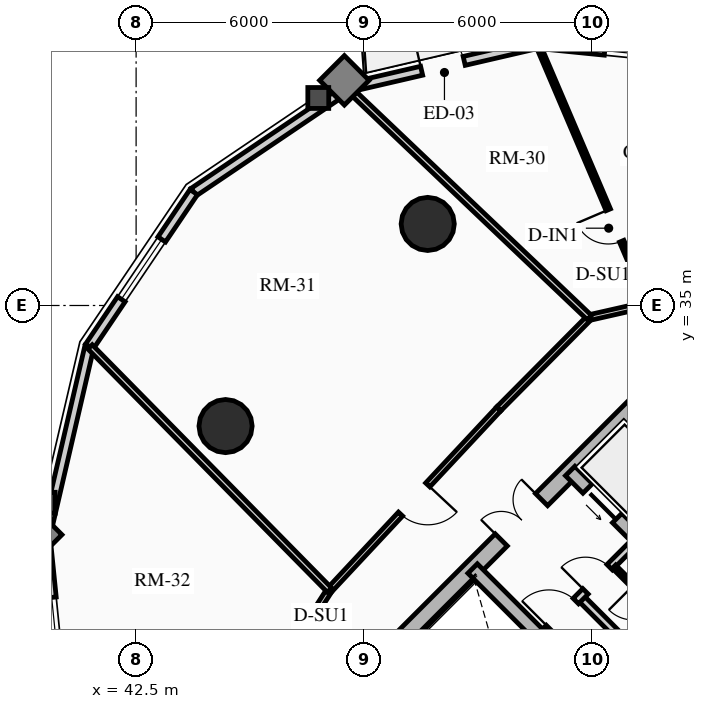
"""IFC4 building model, lengths in metres.
Left out: names, types, materials, properties, quantities, classifications, styles, units other than length and angle.
Written with IfcOpenShell. Run it as: python <this file> out.ifc"""

import sys

from ifc_helpers import new_model, si_unit, direction, frame, frame_2d, origin, origin_2d, place, context, subcontext, project, spatial, rectangle, circle, extrude, source, transform, mapped, element, fill, save


model = new_model("IFC4")
c1 = context("Model", 3, precision=1e-05, world=origin(), true_north=direction((0.0, 1.0)))
c2 = subcontext(c1, "Body", "Model", "MODEL_VIEW")
j1 = project(units=[si_unit("LENGTHUNIT", "METRE"), si_unit("PLANEANGLEUNIT", "RADIAN")], contexts=[c1])
p1 = place(None, origin())
s1 = spatial("IfcSite", under=j1, at=p1, CompositionType="ELEMENT")
p2 = place(p1, origin())
s2 = spatial("IfcBuilding", under=s1, at=p2, CompositionType="ELEMENT")
p3 = place(p2, frame((0.0, 0.0, 84.7)))
s3 = spatial("IfcBuildingStorey", under=s2, at=p3, CompositionType="ELEMENT", Elevation=84.7)
p4 = place(p3, frame((48.856, 25.578, 0.0), z_axis=(0.0, 0.0, 1.0), x_axis=(0.707106781187, 0.707106781187, 0.0)))
e1 = element("IfcWall", 1, at=p4, inside=s3, PredefinedType="SHEAR", context=c2, shape_type="SweptSolid", body=[
    extrude(rectangle(XDim=10.7, YDim=0.45, at=frame_2d((5.35, 0.0))), origin(), (0.0, 0.0, 1.0), 2.91),
])
m1 = source(origin(), c2, "Body", "SweptSolid", [
    extrude(rectangle(XDim=1.5, YDim=2.02, at=frame_2d((0.75, 1.01))), frame((0.0, 0.235, 0.0), z_axis=(0.0, -1.0, 0.0), x_axis=(1.0, 0.0, 0.0)), (0.0, 0.0, 1.0), 0.47),
])
p5 = place(p4, frame((4.6, 0.0, 0.0)))
e2 = element("IfcOpeningElement", 2, at=p5, cuts=e1, PredefinedType="OPENING", context=c2, shape_type="MappedRepresentation", body=[
    mapped(m1, transform((0.0, 0.0, 0.0), x_axis=(1.0, 0.0, 0.0), y_axis=(0.0, 1.0, 0.0), z_axis=(0.0, 0.0, 1.0), scale=1.0)),
])
p6 = place(p3, frame((61.078, 18.355, 0.0), z_axis=(0.0, 0.0, 1.0), x_axis=(-0.707106781187, 0.707106781187, 0.0)))
e3 = element("IfcWall", 3, at=p6, inside=s3, PredefinedType="SHEAR", context=c2, shape_type="SweptSolid", body=[
    extrude(rectangle(XDim=13.75, YDim=0.35, at=frame_2d((6.875, 0.0))), origin(), (0.0, 0.0, 1.0), 2.91),
])
m2 = source(origin(), c2, "Body", "SweptSolid", [
    extrude(rectangle(XDim=1.1, YDim=2.015, at=frame_2d((0.55, 1.007))), frame((0.0, 0.185, 0.0), z_axis=(0.0, -1.0, 0.0), x_axis=(1.0, 0.0, 0.0)), (0.0, 0.0, 1.0), 0.37),
])
p7 = place(p6, frame((4.875, 0.0, 0.0)))
e4 = element("IfcOpeningElement", 4, at=p7, cuts=e3, PredefinedType="OPENING", context=c2, shape_type="MappedRepresentation", body=[
    mapped(m2, transform((0.0, 0.0, 0.0), x_axis=(1.0, 0.0, 0.0), y_axis=(0.0, 1.0, 0.0), z_axis=(0.0, 0.0, 1.0), scale=1.0)),
])
m3 = source(origin(), c2, "Body", "SweptSolid", [
    extrude(rectangle(XDim=1.15, YDim=2.02, at=frame_2d((0.575, 1.01))), frame((0.0, 0.185, 0.0), z_axis=(0.0, -1.0, 0.0), x_axis=(1.0, 0.0, 0.0)), (0.0, 0.0, 1.0), 0.37),
])
p8 = place(p6, frame((7.295, 0.0, 0.0)))
e5 = element("IfcOpeningElement", 5, at=p8, cuts=e3, PredefinedType="OPENING", context=c2, shape_type="MappedRepresentation", body=[
    mapped(m3, transform((0.0, 0.0, 0.0), x_axis=(1.0, 0.0, 0.0), y_axis=(0.0, 1.0, 0.0), z_axis=(0.0, 0.0, 1.0), scale=1.0)),
])
p9 = place(p3, frame((63.645, 20.922, 0.0), z_axis=(0.0, 0.0, 1.0), x_axis=(-0.707106781187, 0.707106781187, 0.0)))
e6 = element("IfcWall", 6, at=p9, inside=s3, PredefinedType="SHEAR", context=c2, shape_type="SweptSolid", body=[
    extrude(rectangle(XDim=13.75, YDim=0.35, at=frame_2d((6.875, 0.0))), origin(), (0.0, 0.0, 1.0), 2.91),
])
p10 = place(p9, frame((10.0, 0.0, 0.0)))
e7 = element("IfcOpeningElement", 7, at=p10, cuts=e6, PredefinedType="OPENING", context=c2, shape_type="MappedRepresentation", body=[
    mapped(m2, transform((0.0, 0.0, 0.0), x_axis=(1.0, 0.0, 0.0), y_axis=(0.0, 1.0, 0.0), z_axis=(0.0, 0.0, 1.0), scale=1.0)),
])
p11 = place(p9, frame((12.0, 0.0, 0.0)))
e8 = element("IfcOpeningElement", 8, at=p11, cuts=e6, PredefinedType="OPENING", context=c2, shape_type="MappedRepresentation", body=[
    mapped(m2, transform((0.0, 0.0, 0.0), x_axis=(1.0, 0.0, 0.0), y_axis=(0.0, 1.0, 0.0), z_axis=(0.0, 0.0, 1.0), scale=1.0)),
])
p12 = place(p9, frame((5.305, 0.0, 0.0)))
e9 = element("IfcOpeningElement", 9, at=p12, cuts=e6, PredefinedType="OPENING", context=c2, shape_type="MappedRepresentation", body=[
    mapped(m3, transform((0.0, 0.0, 0.0), x_axis=(1.0, 0.0, 0.0), y_axis=(0.0, 1.0, 0.0), z_axis=(0.0, 0.0, 1.0), scale=1.0)),
])
for number, where, z_axis, x_axis in (
    (10, (50.173, 37.146, 0.0), (0.0, 0.0, 1.0), (1.0, 0.0, 0.0)),
    (11, (44.854, 31.827, 0.0), (0.0, 0.0, 1.0), (1.0, 0.0, 0.0)),
):
    element("IfcColumn", number, at=place(p3, frame(where, z_axis=z_axis, x_axis=x_axis)), inside=s3, PredefinedType="USERDEFINED", context=c2, shape_type="SweptSolid", body=[
        extrude(circle(Radius=0.7, at=origin_2d()), origin(), (0.0, 0.0, 1.0), 2.91),
    ])
p13 = place(p3, frame((53.067, 41.885, 0.0), z_axis=(0.0, 0.0, 1.0), x_axis=(0.994971754311, -0.10015591906, 0.0)))
e12 = element("IfcWall", 12, at=p13, inside=s3, PredefinedType="SOLIDWALL", context=c2, shape_type="SweptSolid", body=[
    extrude(rectangle(XDim=5.448, YDim=0.24, at=frame_2d((2.724, 0.0))), origin(), (0.0, 0.0, 1.0), 2.179),
])
m4 = source(origin(), c2, "Body", "SweptSolid", [
    extrude(rectangle(XDim=1.9, YDim=1.35, at=frame_2d((0.95, 0.675))), frame((0.0, 0.13, 0.0), z_axis=(0.0, -1.0, 0.0), x_axis=(1.0, 0.0, 0.0)), (0.0, 0.0, 1.0), 0.26),
])
p14 = place(p13, frame((1.774, 0.0, 0.65)))
e13 = element("IfcOpeningElement", 13, at=p14, cuts=e12, PredefinedType="OPENING", context=c2, shape_type="MappedRepresentation", body=[
    mapped(m4, transform((0.0, 0.0, 0.0), x_axis=(1.0, 0.0, 0.0), y_axis=(0.0, 1.0, 0.0), z_axis=(0.0, 0.0, 1.0), scale=1.0)),
])
p15 = place(p3, frame((48.08, 40.729, 0.0), z_axis=(0.0, 0.0, 1.0), x_axis=(0.974165631126, 0.225834725257, 0.0)))
e14 = element("IfcWall", 14, at=p15, inside=s3, PredefinedType="SOLIDWALL", context=c2, shape_type="SweptSolid", body=[
    extrude(rectangle(XDim=5.119, YDim=0.24, at=frame_2d((2.56, 0.0))), origin(), (0.0, 0.0, 1.0), 2.179),
])
m5 = source(origin(), c2, "Body", "SweptSolid", [
    extrude(rectangle(XDim=1.15, YDim=2.005, at=frame_2d((0.575, 1.002))), frame((0.0, 0.13, 0.0), z_axis=(0.0, -1.0, 0.0), x_axis=(1.0, 0.0, 0.0)), (0.0, 0.0, 1.0), 0.26),
])
p16 = place(p15, frame((1.984, 0.0, 0.0)))
e15 = element("IfcOpeningElement", 15, at=p16, cuts=e14, PredefinedType="OPENING", context=c2, shape_type="MappedRepresentation", body=[
    mapped(m5, transform((0.0, 0.0, 0.0), x_axis=(1.0, 0.0, 0.0), y_axis=(0.0, 1.0, 0.0), z_axis=(0.0, 0.0, 1.0), scale=1.0)),
])
p17 = place(p3, frame((44.015, 37.985, 0.0), z_axis=(0.0, 0.0, 1.0), x_axis=(0.828781148131, 0.559572880421, 0.0)))
e16 = element("IfcWall", 16, at=p17, inside=s3, PredefinedType="SOLIDWALL", context=c2, shape_type="SweptSolid", body=[
    extrude(rectangle(XDim=4.905, YDim=0.24, at=frame_2d((2.452, 0.0))), origin(), (0.0, 0.0, 1.0), 2.179),
])
p18 = place(p3, frame((41.271, 33.92, 0.0), z_axis=(0.0, 0.0, 1.0), x_axis=(0.559572880421, 0.828781148131, 0.0)))
e17 = element("IfcWall", 17, at=p18, inside=s3, PredefinedType="SOLIDWALL", context=c2, shape_type="SweptSolid", body=[
    extrude(rectangle(XDim=4.905, YDim=0.24, at=frame_2d((2.452, 0.0))), origin(), (0.0, 0.0, 1.0), 2.179),
])
p19 = place(p18, frame((1.502, 0.0, 0.65)))
e18 = element("IfcOpeningElement", 18, at=p19, cuts=e17, PredefinedType="OPENING", context=c2, shape_type="MappedRepresentation", body=[
    mapped(m4, transform((0.0, 0.0, 0.0), x_axis=(1.0, 0.0, 0.0), y_axis=(0.0, 1.0, 0.0), z_axis=(0.0, 0.0, 1.0), scale=1.0)),
])
p20 = place(p3, frame((40.115, 28.933, 0.0), z_axis=(0.0, 0.0, 1.0), x_axis=(0.225834725257, 0.974165631126, 0.0)))
e19 = element("IfcWall", 19, at=p20, inside=s3, PredefinedType="SOLIDWALL", context=c2, shape_type="SweptSolid", body=[
    extrude(rectangle(XDim=5.119, YDim=0.24, at=frame_2d((2.56, 0.0))), origin(), (0.0, 0.0, 1.0), 2.179),
])
p21 = place(p3, frame((40.661, 23.513, 0.0), z_axis=(0.0, 0.0, 1.0), x_axis=(-0.10015591906, 0.994971754311, 0.0)))
e20 = element("IfcWall", 20, at=p21, inside=s3, PredefinedType="SOLIDWALL", context=c2, shape_type="SweptSolid", body=[
    extrude(rectangle(XDim=5.448, YDim=0.24, at=frame_2d((2.724, 0.0))), origin(), (0.0, 0.0, 1.0), 2.179),
])
m6 = source(origin(), c2, "Body", "SweptSolid", [
    extrude(rectangle(XDim=2.2, YDim=1.35, at=frame_2d((1.1, 0.675))), frame((0.0, 0.13, 0.0), z_axis=(0.0, -1.0, 0.0), x_axis=(1.0, 0.0, 0.0)), (0.0, 0.0, 1.0), 0.26),
])
p22 = place(p21, frame((1.624, 0.0, 0.65)))
e21 = element("IfcOpeningElement", 21, at=p22, cuts=e20, PredefinedType="OPENING", context=c2, shape_type="MappedRepresentation", body=[
    mapped(m6, transform((0.0, 0.0, 0.0), x_axis=(1.0, 0.0, 0.0), y_axis=(0.0, 1.0, 0.0), z_axis=(0.0, 0.0, 1.0), scale=1.0)),
])
p23 = place(p3, frame((54.961, 24.719, 0.0), z_axis=(0.0, 0.0, 1.0), x_axis=(0.707106781187, 0.707106781187, 0.0)))
e22 = element("IfcWall", 22, at=p23, inside=s3, PredefinedType="PARTITIONING", context=c2, shape_type="SweptSolid", body=[
    extrude(rectangle(XDim=3.28, YDim=0.2, at=frame_2d((1.64, 0.0))), origin(), (0.0, 0.0, 1.0), 2.655),
])
m7 = source(origin(), c2, "Body", "SweptSolid", [
    extrude(rectangle(XDim=0.9, YDim=2.005, at=frame_2d((0.45, 1.002))), frame((0.0, 0.11, 0.0), z_axis=(0.0, -1.0, 0.0), x_axis=(1.0, 0.0, 0.0)), (0.0, 0.0, 1.0), 0.22),
])
p24 = place(p23, frame((0.16, 0.0, 0.0)))
e23 = element("IfcOpeningElement", 23, at=p24, cuts=e22, PredefinedType="OPENING", context=c2, shape_type="MappedRepresentation", body=[
    mapped(m7, transform((0.0, 0.0, 0.0), x_axis=(1.0, 0.0, 0.0), y_axis=(0.0, 1.0, 0.0), z_axis=(0.0, 0.0, 1.0), scale=1.0)),
])
p25 = place(p3, frame((55.874, 25.631, 0.0), z_axis=(0.0, 0.0, 1.0), x_axis=(-0.707157639372, 0.707055919343, 0.0)))
e24 = element("IfcWall", 24, at=p25, inside=s3, PredefinedType="PARTITIONING", context=c2, shape_type="SweptSolid", body=[
    extrude(rectangle(XDim=2.4, YDim=0.2, at=frame_2d((1.2, 0.0))), origin(), (0.0, 0.0, 1.0), 2.655),
])
p26 = place(p3, frame((53.264, 26.416, 0.0), z_axis=(0.0, 0.0, 1.0), x_axis=(0.707106781187, 0.707106781187, 0.0)))
e25 = element("IfcWall", 25, at=p26, inside=s3, PredefinedType="PARTITIONING", context=c2, shape_type="SweptSolid", body=[
    extrude(rectangle(XDim=3.28, YDim=0.2, at=frame_2d((1.64, 0.0))), origin(), (0.0, 0.0, 1.0), 2.655),
])
m8 = source(origin(), c2, "Body", "SweptSolid", [
    extrude(rectangle(XDim=1.0, YDim=2.015, at=frame_2d((0.5, 1.007))), frame((0.0, 0.11, 0.0), z_axis=(0.0, -1.0, 0.0), x_axis=(1.0, 0.0, 0.0)), (0.0, 0.0, 1.0), 0.22),
])
p27 = place(p26, frame((0.14, 0.0, 0.0)))
e26 = element("IfcOpeningElement", 26, at=p27, cuts=e25, PredefinedType="OPENING", context=c2, shape_type="MappedRepresentation", body=[
    mapped(m8, transform((0.0, 0.0, 0.0), x_axis=(1.0, 0.0, 0.0), y_axis=(0.0, 1.0, 0.0), z_axis=(0.0, 0.0, 1.0), scale=1.0)),
])
p28 = place(p26, frame((1.5, 0.0, 0.0)))
e27 = element("IfcOpeningElement", 27, at=p28, cuts=e25, PredefinedType="OPENING", context=c2, shape_type="MappedRepresentation", body=[
    mapped(m7, transform((0.0, 0.0, 0.0), x_axis=(1.0, 0.0, 0.0), y_axis=(0.0, 1.0, 0.0), z_axis=(0.0, 0.0, 1.0), scale=1.0)),
])
p29 = place(p3, frame((56.673, 26.529, 0.0), z_axis=(0.0, 0.0, 1.0), x_axis=(-0.707052764397, 0.70716079385, 0.0)))
e28 = element("IfcWall", 28, at=p29, inside=s3, PredefinedType="PARTITIONING", context=c2, shape_type="SweptSolid", body=[
    extrude(rectangle(XDim=2.26, YDim=0.125, at=frame_2d((1.13, 0.0))), origin(), (0.0, 0.0, 1.0), 2.655),
])
m9 = source(origin(), c2, "Body", "SweptSolid", [
    extrude(rectangle(XDim=0.9, YDim=2.005, at=frame_2d((0.45, 1.002))), frame((0.0, 0.073, 0.0), z_axis=(0.0, -1.0, 0.0), x_axis=(1.0, 0.0, 0.0)), (0.0, 0.0, 1.0), 0.145),
])
p30 = place(p29, frame((0.65, 0.0, 0.0)))
e29 = element("IfcOpeningElement", 29, at=p30, cuts=e28, PredefinedType="OPENING", context=c2, shape_type="MappedRepresentation", body=[
    mapped(m9, transform((0.0, 0.0, 0.0), x_axis=(1.0, 0.0, 0.0), y_axis=(0.0, 1.0, 0.0), z_axis=(0.0, 0.0, 1.0), scale=1.0)),
])
p31 = place(p3, frame((55.984, 35.035, 0.0), z_axis=(0.0, 0.0, 1.0), x_axis=(-0.975290305708, -0.22092718165, 0.0)))
e30 = element("IfcWall", 30, at=p31, inside=s3, PredefinedType="PARTITIONING", context=c2, shape_type="SweptSolid", body=[
    extrude(rectangle(XDim=1.597, YDim=0.15, at=frame_2d((0.798, 0.0))), origin(), (0.0, 0.0, 1.0), 2.225),
])
p32 = place(p3, frame((54.427, 34.683, 0.0), z_axis=(0.0, 0.0, 1.0), x_axis=(-0.704178989986, -0.710022499687, 0.0)))
e31 = element("IfcWall", 31, at=p32, inside=s3, PredefinedType="PARTITIONING", context=c2, shape_type="SweptSolid", body=[
    extrude(rectangle(XDim=3.384, YDim=0.15, at=frame_2d((1.692, 0.0))), origin(), (0.0, 0.0, 1.0), 2.225),
])
p33 = place(p3, frame((52.043, 32.28, 0.0), z_axis=(0.0, 0.0, 1.0), x_axis=(-0.682606081633, -0.730786519661, 0.0)))
e32 = element("IfcWall", 32, at=p33, inside=s3, PredefinedType="PARTITIONING", context=c2, shape_type="SweptSolid", body=[
    extrude(rectangle(XDim=6.527, YDim=0.15, at=frame_2d((3.263, 0.0))), origin(), (0.0, 0.0, 1.0), 2.225),
])
m10 = source(origin(), c2, "Body", "SweptSolid", [
    extrude(rectangle(XDim=1.05, YDim=2.015, at=frame_2d((0.525, 1.007))), frame((0.0, 0.085, 0.0), z_axis=(0.0, -1.0, 0.0), x_axis=(1.0, 0.0, 0.0)), (0.0, 0.0, 1.0), 0.17),
])
p34 = place(p33, frame((2.738, 0.0, 0.0)))
e33 = element("IfcOpeningElement", 33, at=p34, cuts=e32, PredefinedType="OPENING", context=c2, shape_type="MappedRepresentation", body=[
    mapped(m10, transform((0.0, 0.0, 0.0), x_axis=(1.0, 0.0, 0.0), y_axis=(0.0, 1.0, 0.0), z_axis=(0.0, 0.0, 1.0), scale=1.0)),
])
p35 = place(p3, frame((47.588, 27.51, 0.0), z_axis=(0.0, 0.0, 1.0), x_axis=(-0.540202619347, -0.841534984449, 0.0)))
e34 = element("IfcWall", 34, at=p35, inside=s3, PredefinedType="PARTITIONING", context=c2, shape_type="SweptSolid", body=[
    extrude(rectangle(XDim=1.935, YDim=0.15, at=frame_2d((0.967, 0.0))), origin(), (0.0, 0.0, 1.0), 2.225),
])
p36 = place(p3, frame((54.427, 34.683, 0.0), z_axis=(0.0, 0.0, 1.0), x_axis=(-0.72454072322, 0.689231993161, 0.0)))
e35 = element("IfcWall", 35, at=p36, inside=s3, PredefinedType="PARTITIONING", context=c2, shape_type="SweptSolid", body=[
    extrude(rectangle(XDim=8.747, YDim=0.16, at=frame_2d((4.374, 0.0))), origin(), (0.0, 0.0, 1.0), 2.179),
])
p37 = place(p3, frame((47.588, 27.51, 0.0), z_axis=(0.0, 0.0, 1.0), x_axis=(-0.701457073903, 0.712711704318, 0.0)))
e36 = element("IfcWall", 36, at=p37, inside=s3, PredefinedType="PARTITIONING", context=c2, shape_type="SweptSolid", body=[
    extrude(rectangle(XDim=8.981, YDim=0.16, at=frame_2d((4.49, 0.0))), origin(), (0.0, 0.0, 1.0), 2.179),
])
p38 = place(p3, frame((55.984, 35.035, 0.0), z_axis=(0.0, 0.0, 1.0), x_axis=(-0.392438685048, 0.919778168081, 0.0)))
e37 = element("IfcWall", 37, at=p38, inside=s3, PredefinedType="PARTITIONING", context=c2, shape_type="SweptSolid", body=[
    extrude(rectangle(XDim=7.426, YDim=0.125, at=frame_2d((3.713, 0.0))), origin(), (0.0, 0.0, 1.0), 2.179),
])
p39 = place(p38, frame((1.8, 0.0, 0.0)))
e38 = element("IfcOpeningElement", 38, at=p39, cuts=e37, PredefinedType="OPENING", context=c2, shape_type="MappedRepresentation", body=[
    mapped(m9, transform((0.0, 0.0, 0.0), x_axis=(1.0, 0.0, 0.0), y_axis=(0.0, 1.0, 0.0), z_axis=(0.0, 0.0, 1.0), scale=1.0)),
])
m11 = source(origin(), c2, "Body", "SweptSolid", [
    extrude(rectangle(XDim=1.9, YDim=1.35, at=frame_2d((0.95, 0.675))), frame((0.0, 0.03, 0.0), z_axis=(0.0, -1.0, 0.0), x_axis=(1.0, 0.0, 0.0)), (0.0, 0.0, 1.0), 0.06),
])
p40 = place(p14, origin())
e39 = element("IfcWindow", 39, at=p40, inside=s3, PartitioningType="DOUBLE_PANEL_VERTICAL", PredefinedType="WINDOW", context=c2, shape_type="MappedRepresentation", body=[
    mapped(m11, transform((0.0, 0.0, 0.0), x_axis=(1.0, 0.0, 0.0), y_axis=(0.0, 1.0, 0.0), z_axis=(0.0, 0.0, 1.0), scale=1.0)),
])
fill(e13, e39)
m12 = source(origin(), c2, "Body", "SweptSolid", [
    extrude(rectangle(XDim=1.15, YDim=2.005, at=frame_2d((0.575, 1.002))), frame((0.0, 0.025, 0.0), z_axis=(0.0, -1.0, 0.0), x_axis=(1.0, 0.0, 0.0)), (0.0, 0.0, 1.0), 0.05),
])
p41 = place(p16, origin())
e40 = element("IfcDoor", 40, at=p41, inside=s3, OperationType="SINGLE_SWING_LEFT", PredefinedType="DOOR", context=c2, shape_type="MappedRepresentation", body=[
    mapped(m12, transform((0.0, 0.0, 0.0), x_axis=(1.0, 0.0, 0.0), y_axis=(0.0, 1.0, 0.0), z_axis=(0.0, 0.0, 1.0), scale=1.0)),
])
fill(e15, e40)
p42 = place(p19, origin())
e41 = element("IfcWindow", 41, at=p42, inside=s3, PartitioningType="DOUBLE_PANEL_VERTICAL", PredefinedType="WINDOW", context=c2, shape_type="MappedRepresentation", body=[
    mapped(m11, transform((0.0, 0.0, 0.0), x_axis=(1.0, 0.0, 0.0), y_axis=(0.0, 1.0, 0.0), z_axis=(0.0, 0.0, 1.0), scale=1.0)),
])
fill(e18, e41)
m13 = source(origin(), c2, "Body", "SweptSolid", [
    extrude(rectangle(XDim=2.2, YDim=1.35, at=frame_2d((1.1, 0.675))), frame((0.0, 0.03, 0.0), z_axis=(0.0, -1.0, 0.0), x_axis=(1.0, 0.0, 0.0)), (0.0, 0.0, 1.0), 0.06),
])
p43 = place(p22, origin())
e42 = element("IfcWindow", 42, at=p43, inside=s3, PartitioningType="DOUBLE_PANEL_VERTICAL", PredefinedType="WINDOW", context=c2, shape_type="MappedRepresentation", body=[
    mapped(m13, transform((0.0, 0.0, 0.0), x_axis=(1.0, 0.0, 0.0), y_axis=(0.0, 1.0, 0.0), z_axis=(0.0, 0.0, 1.0), scale=1.0)),
])
fill(e21, e42)
m14 = source(origin(), c2, "Body", "SweptSolid", [
    extrude(rectangle(XDim=1.1, YDim=2.015, at=frame_2d((0.55, 1.007))), frame((0.0, 0.025, 0.0), z_axis=(0.0, -1.0, 0.0), x_axis=(1.0, 0.0, 0.0)), (0.0, 0.0, 1.0), 0.05),
])
p44 = place(p11, origin())
e43 = element("IfcDoor", 43, at=p44, inside=s3, OperationType="SLIDING_TO_LEFT", PredefinedType="DOOR", context=c2, shape_type="MappedRepresentation", body=[
    mapped(m14, transform((0.0, 0.0, 0.0), x_axis=(1.0, 0.0, 0.0), y_axis=(0.0, 1.0, 0.0), z_axis=(0.0, 0.0, 1.0), scale=1.0)),
])
fill(e8, e43)
m15 = source(origin(), c2, "Body", "SweptSolid", [
    extrude(rectangle(XDim=1.5, YDim=2.02, at=frame_2d((0.75, 1.01))), frame((0.0, 0.025, 0.0), z_axis=(0.0, -1.0, 0.0), x_axis=(1.0, 0.0, 0.0)), (0.0, 0.0, 1.0), 0.05),
])
p45 = place(p5, origin())
e44 = element("IfcDoor", 44, at=p45, inside=s3, OperationType="DOUBLE_DOOR_SINGLE_SWING", PredefinedType="DOOR", context=c2, shape_type="MappedRepresentation", body=[
    mapped(m15, transform((0.0, 0.0, 0.0), x_axis=(1.0, 0.0, 0.0), y_axis=(0.0, 1.0, 0.0), z_axis=(0.0, 0.0, 1.0), scale=1.0)),
])
fill(e2, e44)
m16 = source(origin(), c2, "Body", "SweptSolid", [
    extrude(rectangle(XDim=1.0, YDim=2.015, at=frame_2d((0.5, 1.007))), frame((0.0, 0.025, 0.0), z_axis=(0.0, -1.0, 0.0), x_axis=(1.0, 0.0, 0.0)), (0.0, 0.0, 1.0), 0.05),
])
p46 = place(p27, origin())
e45 = element("IfcDoor", 45, at=p46, inside=s3, OperationType="SINGLE_SWING_LEFT", PredefinedType="DOOR", context=c2, shape_type="MappedRepresentation", body=[
    mapped(m16, transform((0.0, 0.0, 0.0), x_axis=(1.0, 0.0, 0.0), y_axis=(0.0, 1.0, 0.0), z_axis=(0.0, 0.0, 1.0), scale=1.0)),
])
fill(e26, e45)
m17 = source(origin(), c2, "Body", "SweptSolid", [
    extrude(rectangle(XDim=0.9, YDim=2.005, at=frame_2d((0.45, 1.002))), frame((0.0, 0.025, 0.0), z_axis=(0.0, -1.0, 0.0), x_axis=(1.0, 0.0, 0.0)), (0.0, 0.0, 1.0), 0.05),
])
p47 = place(p28, origin())
e46 = element("IfcDoor", 46, at=p47, inside=s3, OperationType="SINGLE_SWING_LEFT", PredefinedType="DOOR", context=c2, shape_type="MappedRepresentation", body=[
    mapped(m17, transform((0.0, 0.0, 0.0), x_axis=(1.0, 0.0, 0.0), y_axis=(0.0, 1.0, 0.0), z_axis=(0.0, 0.0, 1.0), scale=1.0)),
])
fill(e27, e46)
p48 = place(p39, origin())
e47 = element("IfcDoor", 47, at=p48, inside=s3, OperationType="SINGLE_SWING_RIGHT", PredefinedType="DOOR", context=c2, shape_type="MappedRepresentation", body=[
    mapped(m17, transform((0.0, 0.0, 0.0), x_axis=(1.0, 0.0, 0.0), y_axis=(0.0, 1.0, 0.0), z_axis=(0.0, 0.0, 1.0), scale=1.0)),
])
fill(e38, e47)
m18 = source(origin(), c2, "Body", "SweptSolid", [
    extrude(rectangle(XDim=1.05, YDim=2.015, at=frame_2d((0.525, 1.007))), frame((0.0, 0.025, 0.0), z_axis=(0.0, -1.0, 0.0), x_axis=(1.0, 0.0, 0.0)), (0.0, 0.0, 1.0), 0.05),
])
p49 = place(p34, origin())
e48 = element("IfcDoor", 48, at=p49, inside=s3, OperationType="SINGLE_SWING_LEFT", PredefinedType="DOOR", context=c2, shape_type="MappedRepresentation", body=[
    mapped(m18, transform((0.0, 0.0, 0.0), x_axis=(1.0, 0.0, 0.0), y_axis=(0.0, 1.0, 0.0), z_axis=(0.0, 0.0, 1.0), scale=1.0)),
])
fill(e33, e48)
save(model, sys.argv[1])
